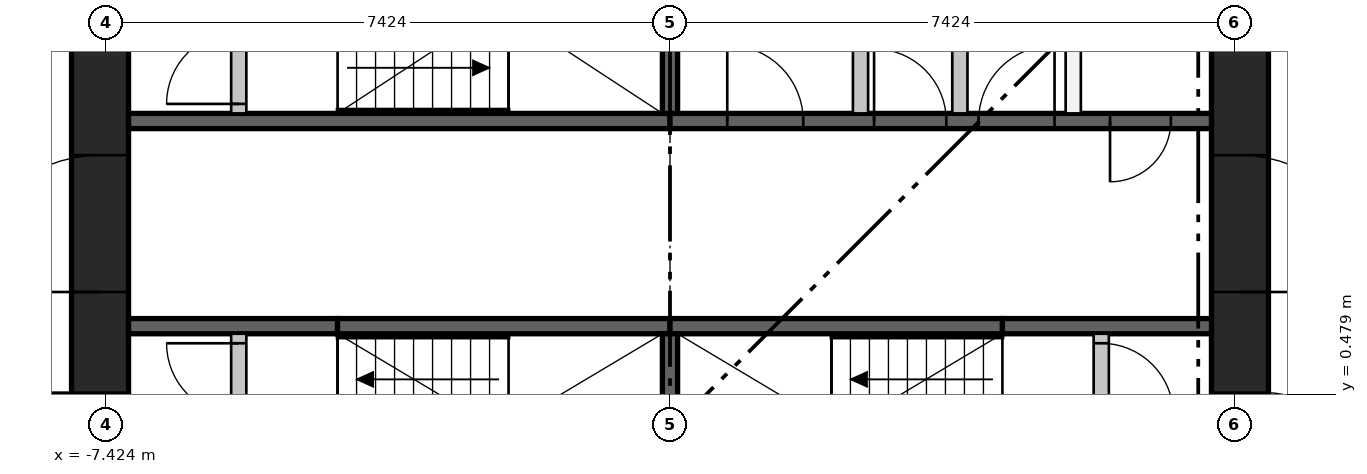
"""IFC4 building model, lengths in metres.
Left out: names, types, materials, properties, quantities, classifications, styles, units other than length and angle.
Written with IfcOpenShell. Run it as: python <this file> out.ifc"""

import sys

from ifc_helpers import new_model, si_unit, direction, frame, frame_2d, origin, place, context, subcontext, project, spatial, rectangle, extrude, element, fill, save


model = new_model("IFC4")
c1 = context("Model", 3, precision=1e-05, world=origin(), true_north=direction((0.0, 1.0)))
c2 = subcontext(c1, "Body", "Model", "MODEL_VIEW")
j1 = project(units=[si_unit("LENGTHUNIT", "METRE"), si_unit("PLANEANGLEUNIT", "RADIAN")], contexts=[c1])
p1 = place(None, origin())
s1 = spatial("IfcSite", under=j1, at=p1, CompositionType="ELEMENT")
p2 = place(p1, origin())
s2 = spatial("IfcBuilding", under=s1, at=p2, CompositionType="ELEMENT")
p3 = place(p2, frame((0.0, 0.0, 76.4)))
s3 = spatial("IfcBuildingStorey", under=s2, at=p3, CompositionType="ELEMENT", Elevation=76.4)
p4 = place(p3, frame((-7.499, -7.124, 0.0), z_axis=(0.0, 0.0, 1.0), x_axis=(0.0, 1.0, 0.0)))
e1 = element("IfcWall", 1, at=p4, inside=s3, PredefinedType="SHEAR", context=c2, shape_type="SweptSolid", body=[
    extrude(rectangle(XDim=14.248, YDim=0.75, at=frame_2d((7.124, 0.0))), origin(), (0.0, 0.0, 1.0), 3.65),
])
p5 = place(p4, frame((6.624, 0.0, 0.0)))
e2 = element("IfcOpeningElement", 2, at=p5, cuts=e1, PredefinedType="OPENING", context=c2, shape_type="SweptSolid", body=[
    extrude(rectangle(XDim=1.0, YDim=2.1, at=frame_2d((0.5, 1.05))), frame((0.0, 0.385, 0.0), z_axis=(0.0, -1.0, 0.0), x_axis=(1.0, 0.0, 0.0)), (0.0, 0.0, 1.0), 0.77),
])
p6 = place(p4, frame((3.5, 0.0, 0.0)))
e3 = element("IfcOpeningElement", 3, at=p6, cuts=e1, PredefinedType="OPENING", context=c2, shape_type="SweptSolid", body=[
    extrude(rectangle(XDim=1.8, YDim=2.1, at=frame_2d((0.9, 1.05))), frame((0.0, 0.385, 0.0), z_axis=(0.0, -1.0, 0.0), x_axis=(1.0, 0.0, 0.0)), (0.0, 0.0, 1.0), 0.77),
])
p7 = place(p4, frame((8.948, 0.0, 0.0)))
e4 = element("IfcOpeningElement", 4, at=p7, cuts=e1, PredefinedType="OPENING", context=c2, shape_type="SweptSolid", body=[
    extrude(rectangle(XDim=1.8, YDim=2.1, at=frame_2d((0.9, 1.05))), frame((0.0, 0.385, 0.0), z_axis=(0.0, -1.0, 0.0), x_axis=(1.0, 0.0, 0.0)), (0.0, 0.0, 1.0), 0.77),
])
p8 = place(p4, frame((12.124, 0.0, 0.0)))
e5 = element("IfcOpeningElement", 5, at=p8, cuts=e1, PredefinedType="OPENING", context=c2, shape_type="SweptSolid", body=[
    extrude(rectangle(XDim=1.0, YDim=2.1, at=frame_2d((0.5, 1.05))), frame((0.0, 0.385, 0.0), z_axis=(0.0, -1.0, 0.0), x_axis=(1.0, 0.0, 0.0)), (0.0, 0.0, 1.0), 0.77),
])
p9 = place(p3, frame((7.499, -7.124, 0.0), z_axis=(0.0, 0.0, 1.0), x_axis=(0.0, 1.0, 0.0)))
e6 = element("IfcWall", 6, at=p9, inside=s3, PredefinedType="SHEAR", context=c2, shape_type="SweptSolid", body=[
    extrude(rectangle(XDim=14.248, YDim=0.75, at=frame_2d((7.124, 0.0))), origin(), (0.0, 0.0, 1.0), 3.65),
])
p10 = place(p9, frame((6.624, 0.0, 0.0)))
e7 = element("IfcOpeningElement", 7, at=p10, cuts=e6, PredefinedType="OPENING", context=c2, shape_type="SweptSolid", body=[
    extrude(rectangle(XDim=1.0, YDim=2.1, at=frame_2d((0.5, 1.05))), frame((0.0, 0.385, 0.0), z_axis=(0.0, -1.0, 0.0), x_axis=(1.0, 0.0, 0.0)), (0.0, 0.0, 1.0), 0.77),
])
p11 = place(p9, frame((3.5, 0.0, 0.0)))
e8 = element("IfcOpeningElement", 8, at=p11, cuts=e6, PredefinedType="OPENING", context=c2, shape_type="SweptSolid", body=[
    extrude(rectangle(XDim=1.8, YDim=2.1, at=frame_2d((0.9, 1.05))), frame((0.0, 0.385, 0.0), z_axis=(0.0, -1.0, 0.0), x_axis=(1.0, 0.0, 0.0)), (0.0, 0.0, 1.0), 0.77),
])
p12 = place(p9, frame((8.948, 0.0, 0.0)))
e9 = element("IfcOpeningElement", 9, at=p12, cuts=e6, PredefinedType="OPENING", context=c2, shape_type="SweptSolid", body=[
    extrude(rectangle(XDim=1.8, YDim=2.1, at=frame_2d((0.9, 1.05))), frame((0.0, 0.385, 0.0), z_axis=(0.0, -1.0, 0.0), x_axis=(1.0, 0.0, 0.0)), (0.0, 0.0, 1.0), 0.77),
])
p13 = place(p3, frame((-7.124, 4.074, 0.0), z_axis=(0.0, 0.0, 1.0), x_axis=(1.0, 0.0, 0.0)))
e10 = element("IfcWall", 10, at=p13, inside=s3, PredefinedType="SHEAR", context=c2, shape_type="SweptSolid", body=[
    extrude(rectangle(XDim=7.124, YDim=0.2, at=frame_2d((3.562, 0.0))), origin(), (0.0, 0.0, 1.0), 3.3),
])
p14 = place(p3, frame((0.0, 4.074, 0.0), z_axis=(0.0, 0.0, 1.0), x_axis=(1.0, 0.0, 0.0)))
e11 = element("IfcWall", 11, at=p14, inside=s3, PredefinedType="SHEAR", context=c2, shape_type="SweptSolid", body=[
    extrude(rectangle(XDim=7.124, YDim=0.2, at=frame_2d((3.562, 0.0))), origin(), (0.0, 0.0, 1.0), 3.3),
])
p15 = place(p14, frame((0.753, 0.0, 0.0)))
e12 = element("IfcOpeningElement", 12, at=p15, cuts=e11, PredefinedType="OPENING", context=c2, shape_type="SweptSolid", body=[
    extrude(rectangle(XDim=1.0, YDim=2.1, at=frame_2d((0.5, 1.05))), frame((0.0, 0.11, 0.0), z_axis=(0.0, -1.0, 0.0), x_axis=(1.0, 0.0, 0.0)), (0.0, 0.0, 1.0), 0.22),
])
p16 = place(p14, frame((2.685, 0.0, 0.0)))
e13 = element("IfcOpeningElement", 13, at=p16, cuts=e11, PredefinedType="OPENING", context=c2, shape_type="SweptSolid", body=[
    extrude(rectangle(XDim=0.95, YDim=2.1, at=frame_2d((0.475, 1.05))), frame((0.0, 0.11, 0.0), z_axis=(0.0, -1.0, 0.0), x_axis=(1.0, 0.0, 0.0)), (0.0, 0.0, 1.0), 0.22),
])
p17 = place(p14, frame((4.06, 0.0, 0.0)))
e14 = element("IfcOpeningElement", 14, at=p17, cuts=e11, PredefinedType="OPENING", context=c2, shape_type="SweptSolid", body=[
    extrude(rectangle(XDim=1.0, YDim=2.1, at=frame_2d((0.5, 1.05))), frame((0.0, 0.11, 0.0), z_axis=(0.0, -1.0, 0.0), x_axis=(1.0, 0.0, 0.0)), (0.0, 0.0, 1.0), 0.22),
])
p18 = place(p14, frame((5.79, 0.0, 0.0)))
e15 = element("IfcOpeningElement", 15, at=p18, cuts=e11, PredefinedType="OPENING", context=c2, shape_type="SweptSolid", body=[
    extrude(rectangle(XDim=0.8, YDim=2.1, at=frame_2d((0.4, 1.05))), frame((0.0, 0.11, 0.0), z_axis=(0.0, -1.0, 0.0), x_axis=(1.0, 0.0, 0.0)), (0.0, 0.0, 1.0), 0.22),
])
p19 = place(p3, frame((-7.124, 1.375, 0.0), z_axis=(0.0, 0.0, 1.0), x_axis=(1.0, 0.0, 0.0)))
e16 = element("IfcWall", 16, at=p19, inside=s3, PredefinedType="SHEAR", context=c2, shape_type="SweptSolid", body=[
    extrude(rectangle(XDim=2.75, YDim=0.2, at=frame_2d((1.375, 0.0))), origin(), (0.0, 0.0, 1.0), 3.3),
])
for number, where, z_axis, x_axis in (
    (17, (-4.374, 1.375, 0.0), (0.0, 0.0, 1.0), (1.0, 0.0, 0.0)),
    (18, (0.0, 1.375, 0.0), (0.0, 0.0, 1.0), (1.0, 0.0, 0.0)),
):
    element("IfcWall", number, at=place(p3, frame(where, z_axis=z_axis, x_axis=x_axis)), inside=s3, PredefinedType="SHEAR", context=c2, shape_type="SweptSolid", body=[
        extrude(rectangle(XDim=4.374, YDim=0.2, at=frame_2d((2.187, 0.0))), origin(), (0.0, 0.0, 1.0), 3.3),
    ])
p20 = place(p3, frame((4.374, 1.375, 0.0), z_axis=(0.0, 0.0, 1.0), x_axis=(1.0, 0.0, 0.0)))
e19 = element("IfcWall", 19, at=p20, inside=s3, PredefinedType="SHEAR", context=c2, shape_type="SweptSolid", body=[
    extrude(rectangle(XDim=2.75, YDim=0.2, at=frame_2d((1.375, 0.0))), origin(), (0.0, 0.0, 1.0), 3.3),
])
p21 = place(p3, frame((0.0, -1.275, 0.0), z_axis=(0.0, 0.0, 1.0), x_axis=(0.0, 1.0, 0.0)))
e20 = element("IfcWall", 20, at=p21, inside=s3, PredefinedType="SHEAR", context=c2, shape_type="SweptSolid", body=[
    extrude(rectangle(XDim=2.55, YDim=0.2, at=frame_2d((1.275, 0.0))), origin(), (0.0, 0.0, 1.0), 3.3),
])
p22 = place(p3, frame((0.0, 4.174, 0.0), z_axis=(0.0, 0.0, 1.0), x_axis=(0.0, 1.0, 0.0)))
e21 = element("IfcWall", 21, at=p22, inside=s3, PredefinedType="SHEAR", context=c2, shape_type="SweptSolid", body=[
    extrude(rectangle(XDim=1.4, YDim=0.2, at=frame_2d((0.7, 0.0))), origin(), (0.0, 0.0, 1.0), 3.3),
])
for number, where, z_axis, x_axis in (
    (22, (2.507, 4.174, 0.0), (0.0, 0.0, 1.0), (0.0, 1.0, 0.0)),
    (23, (3.814, 4.174, 0.0), (0.0, 0.0, 1.0), (0.0, 1.0, 0.0)),
    (24, (5.305, 4.174, 0.0), (0.0, 0.0, 1.0), (0.0, 1.0, 0.0)),
):
    element("IfcWall", number, at=place(p3, frame(where, z_axis=z_axis, x_axis=x_axis)), inside=s3, PredefinedType="PARTITIONING", context=c2, shape_type="SweptSolid", body=[
        extrude(rectangle(XDim=2.95, YDim=0.2, at=frame_2d((1.475, 0.0))), origin(), (0.0, 0.0, 1.0), 3.3),
    ])
p23 = place(p3, frame((-5.674, -1.275, 0.0), z_axis=(0.0, 0.0, 1.0), x_axis=(0.0, 1.0, 0.0)))
e25 = element("IfcWall", 25, at=p23, inside=s3, PredefinedType="PARTITIONING", context=c2, shape_type="SweptSolid", body=[
    extrude(rectangle(XDim=2.55, YDim=0.2, at=frame_2d((1.275, 0.0))), origin(), (0.0, 0.0, 1.0), 3.3),
])
p24 = place(p23, frame((0.125, 0.0, 0.0)))
e26 = element("IfcOpeningElement", 26, at=p24, cuts=e25, PredefinedType="OPENING", context=c2, shape_type="SweptSolid", body=[
    extrude(rectangle(XDim=0.95, YDim=2.1, at=frame_2d((0.475, 1.05))), frame((0.0, 0.11, 0.0), z_axis=(0.0, -1.0, 0.0), x_axis=(1.0, 0.0, 0.0)), (0.0, 0.0, 1.0), 0.22),
])
p25 = place(p23, frame((1.475, 0.0, 0.0)))
e27 = element("IfcOpeningElement", 27, at=p25, cuts=e25, PredefinedType="OPENING", context=c2, shape_type="SweptSolid", body=[
    extrude(rectangle(XDim=0.95, YDim=2.1, at=frame_2d((0.475, 1.05))), frame((0.0, 0.11, 0.0), z_axis=(0.0, -1.0, 0.0), x_axis=(1.0, 0.0, 0.0)), (0.0, 0.0, 1.0), 0.22),
])
p26 = place(p3, frame((5.674, -1.275, 0.0), z_axis=(0.0, 0.0, 1.0), x_axis=(0.0, 1.0, 0.0)))
e28 = element("IfcWall", 28, at=p26, inside=s3, PredefinedType="PARTITIONING", context=c2, shape_type="SweptSolid", body=[
    extrude(rectangle(XDim=2.55, YDim=0.2, at=frame_2d((1.275, 0.0))), origin(), (0.0, 0.0, 1.0), 3.3),
])
p27 = place(p26, frame((0.125, 0.0, 0.0)))
e29 = element("IfcOpeningElement", 29, at=p27, cuts=e28, PredefinedType="OPENING", context=c2, shape_type="SweptSolid", body=[
    extrude(rectangle(XDim=0.95, YDim=2.1, at=frame_2d((0.475, 1.05))), frame((0.0, 0.11, 0.0), z_axis=(0.0, -1.0, 0.0), x_axis=(1.0, 0.0, 0.0)), (0.0, 0.0, 1.0), 0.22),
])
p28 = place(p26, frame((1.475, 0.0, 0.0)))
e30 = element("IfcOpeningElement", 30, at=p28, cuts=e28, PredefinedType="OPENING", context=c2, shape_type="SweptSolid", body=[
    extrude(rectangle(XDim=0.95, YDim=2.1, at=frame_2d((0.475, 1.05))), frame((0.0, 0.11, 0.0), z_axis=(0.0, -1.0, 0.0), x_axis=(1.0, 0.0, 0.0)), (0.0, 0.0, 1.0), 0.22),
])
p29 = place(p3, frame((-5.674, 4.174, 0.0), z_axis=(0.0, 0.0, 1.0), x_axis=(0.0, 1.0, 0.0)))
e31 = element("IfcWall", 31, at=p29, inside=s3, PredefinedType="PARTITIONING", context=c2, shape_type="SweptSolid", body=[
    extrude(rectangle(XDim=2.95, YDim=0.2, at=frame_2d((1.475, 0.0))), origin(), (0.0, 0.0, 1.0), 3.3),
])
p30 = place(p29, frame((0.125, 0.0, 0.0)))
e32 = element("IfcOpeningElement", 32, at=p30, cuts=e31, PredefinedType="OPENING", context=c2, shape_type="SweptSolid", body=[
    extrude(rectangle(XDim=0.95, YDim=2.1, at=frame_2d((0.475, 1.05))), frame((0.0, 0.11, 0.0), z_axis=(0.0, -1.0, 0.0), x_axis=(1.0, 0.0, 0.0)), (0.0, 0.0, 1.0), 0.22),
])
p31 = place(p29, frame((1.725, 0.0, 0.0)))
e33 = element("IfcOpeningElement", 33, at=p31, cuts=e31, PredefinedType="OPENING", context=c2, shape_type="SweptSolid", body=[
    extrude(rectangle(XDim=0.95, YDim=2.1, at=frame_2d((0.475, 1.05))), frame((0.0, 0.11, 0.0), z_axis=(0.0, -1.0, 0.0), x_axis=(1.0, 0.0, 0.0)), (0.0, 0.0, 1.0), 0.22),
])
p32 = place(p25, origin())
e34 = element("IfcDoor", 34, at=p32, inside=s3, OperationType="SINGLE_SWING_RIGHT", PredefinedType="DOOR", context=c2, shape_type="SweptSolid", body=[
    extrude(rectangle(XDim=0.95, YDim=2.1, at=frame_2d((0.475, 1.05))), frame((0.0, 0.025, 0.0), z_axis=(0.0, -1.0, 0.0), x_axis=(1.0, 0.0, 0.0)), (0.0, 0.0, 1.0), 0.05),
])
fill(e27, e34)
p33 = place(p28, frame((0.95, 0.0, 0.0), z_axis=(0.0, 0.0, 1.0), x_axis=(-1.0, 0.0, 0.0)))
e35 = element("IfcDoor", 35, at=p33, inside=s3, OperationType="SINGLE_SWING_LEFT", PredefinedType="DOOR", context=c2, shape_type="SweptSolid", body=[
    extrude(rectangle(XDim=0.95, YDim=2.1, at=frame_2d((0.475, 1.05))), frame((0.0, 0.025, 0.0), z_axis=(0.0, -1.0, 0.0), x_axis=(1.0, 0.0, 0.0)), (0.0, 0.0, 1.0), 0.05),
])
fill(e30, e35)
p34 = place(p30, origin())
e36 = element("IfcDoor", 36, at=p34, inside=s3, OperationType="SINGLE_SWING_LEFT", PredefinedType="DOOR", context=c2, shape_type="SweptSolid", body=[
    extrude(rectangle(XDim=0.95, YDim=2.1, at=frame_2d((0.475, 1.05))), frame((0.0, 0.025, 0.0), z_axis=(0.0, -1.0, 0.0), x_axis=(1.0, 0.0, 0.0)), (0.0, 0.0, 1.0), 0.05),
])
fill(e32, e36)
p35 = place(p15, origin())
e37 = element("IfcDoor", 37, at=p35, inside=s3, OperationType="SINGLE_SWING_LEFT", PredefinedType="DOOR", context=c2, shape_type="SweptSolid", body=[
    extrude(rectangle(XDim=1.0, YDim=2.1, at=frame_2d((0.5, 1.05))), frame((0.0, 0.025, 0.0), z_axis=(0.0, -1.0, 0.0), x_axis=(1.0, 0.0, 0.0)), (0.0, 0.0, 1.0), 0.05),
])
fill(e12, e37)
p36 = place(p16, origin())
e38 = element("IfcDoor", 38, at=p36, inside=s3, OperationType="SINGLE_SWING_LEFT", PredefinedType="DOOR", context=c2, shape_type="SweptSolid", body=[
    extrude(rectangle(XDim=0.95, YDim=2.1, at=frame_2d((0.475, 1.05))), frame((0.0, 0.025, 0.0), z_axis=(0.0, -1.0, 0.0), x_axis=(1.0, 0.0, 0.0)), (0.0, 0.0, 1.0), 0.05),
])
fill(e13, e38)
p37 = place(p17, origin())
e39 = element("IfcDoor", 39, at=p37, inside=s3, OperationType="SINGLE_SWING_RIGHT", PredefinedType="DOOR", context=c2, shape_type="SweptSolid", body=[
    extrude(rectangle(XDim=1.0, YDim=2.1, at=frame_2d((0.5, 1.05))), frame((0.0, 0.025, 0.0), z_axis=(0.0, -1.0, 0.0), x_axis=(1.0, 0.0, 0.0)), (0.0, 0.0, 1.0), 0.05),
])
fill(e14, e39)
p38 = place(p18, frame((0.8, 0.0, 0.0), z_axis=(0.0, 0.0, 1.0), x_axis=(-1.0, 0.0, 0.0)))
e40 = element("IfcDoor", 40, at=p38, inside=s3, OperationType="SINGLE_SWING_LEFT", PredefinedType="DOOR", context=c2, shape_type="SweptSolid", body=[
    extrude(rectangle(XDim=0.8, YDim=2.1, at=frame_2d((0.4, 1.05))), frame((0.0, 0.025, 0.0), z_axis=(0.0, -1.0, 0.0), x_axis=(1.0, 0.0, 0.0)), (0.0, 0.0, 1.0), 0.05),
])
fill(e15, e40)
p39 = place(p5, origin())
e41 = element("IfcDoor", 41, at=p39, inside=s3, OperationType="SINGLE_SWING_RIGHT", PredefinedType="DOOR", context=c2, shape_type="SweptSolid", body=[
    extrude(rectangle(XDim=1.0, YDim=2.1, at=frame_2d((0.5, 1.05))), frame((0.0, 0.375, 0.0), z_axis=(0.0, -1.0, 0.0), x_axis=(1.0, 0.0, 0.0)), (0.0, 0.0, 1.0), 0.05),
])
fill(e2, e41)
p40 = place(p7, origin())
e42 = element("IfcDoor", 42, at=p40, inside=s3, OperationType="DOUBLE_DOOR_SINGLE_SWING", PredefinedType="DOOR", context=c2, shape_type="SweptSolid", body=[
    extrude(rectangle(XDim=1.8, YDim=2.1, at=frame_2d((0.9, 1.05))), frame((0.0, 0.025, 0.0), z_axis=(0.0, -1.0, 0.0), x_axis=(1.0, 0.0, 0.0)), (0.0, 0.0, 1.0), 0.05),
])
fill(e4, e42)
p41 = place(p10, frame((1.0, 0.0, 0.0), z_axis=(0.0, 0.0, 1.0), x_axis=(-1.0, 0.0, 0.0)))
e43 = element("IfcDoor", 43, at=p41, inside=s3, OperationType="SINGLE_SWING_LEFT", PredefinedType="DOOR", context=c2, shape_type="SweptSolid", body=[
    extrude(rectangle(XDim=1.0, YDim=2.1, at=frame_2d((0.5, 1.05))), frame((0.0, 0.375, 0.0), z_axis=(0.0, -1.0, 0.0), x_axis=(1.0, 0.0, 0.0)), (0.0, 0.0, 1.0), 0.05),
])
fill(e7, e43)
p42 = place(p12, frame((1.8, 0.0, 0.0), z_axis=(0.0, 0.0, 1.0), x_axis=(-1.0, 0.0, 0.0)))
e44 = element("IfcDoor", 44, at=p42, inside=s3, OperationType="DOUBLE_DOOR_SINGLE_SWING", PredefinedType="DOOR", context=c2, shape_type="SweptSolid", body=[
    extrude(rectangle(XDim=1.8, YDim=2.1, at=frame_2d((0.9, 1.05))), frame((0.0, 0.025, 0.0), z_axis=(0.0, -1.0, 0.0), x_axis=(1.0, 0.0, 0.0)), (0.0, 0.0, 1.0), 0.05),
])
fill(e9, e44)
save(model, sys.argv[1])
